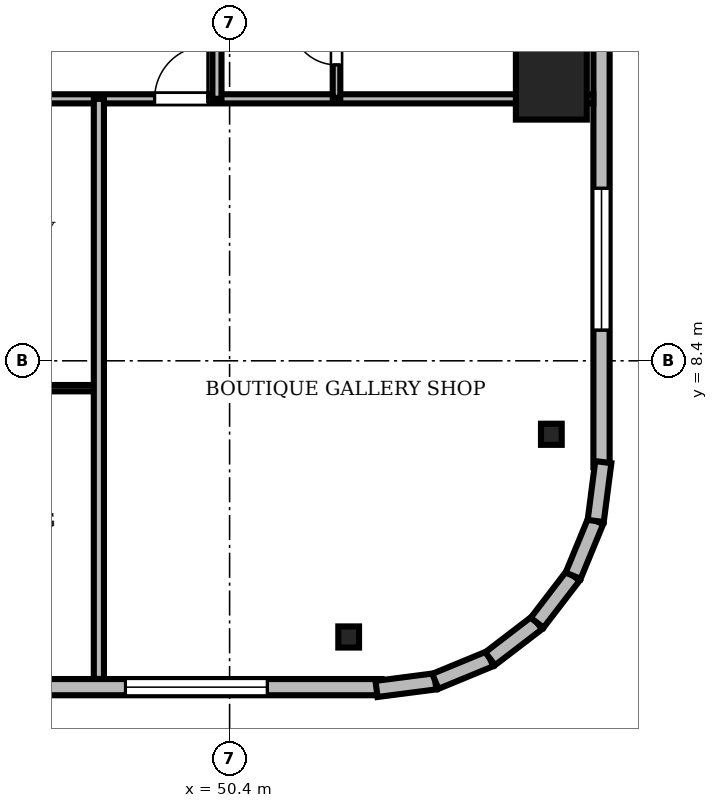
"""IFC4 building model, lengths in metres.
Left out: names, types, materials, properties, quantities, classifications, styles, units other than length and angle.
Written with IfcOpenShell. Run it as: python <this file> out.ifc"""

import sys

from ifc_helpers import new_model, si_unit, direction, frame, frame_2d, origin, origin_2d, place, context, subcontext, project, spatial, rectangle, i_section, extrude, source, transform, mapped, element, fill, save


model = new_model("IFC4")
c1 = context("Model", 3, precision=1e-05, world=origin(), true_north=direction((0.0, 1.0)))
c2 = subcontext(c1, "Body", "Model", "MODEL_VIEW")
j1 = project(units=[si_unit("LENGTHUNIT", "METRE"), si_unit("PLANEANGLEUNIT", "RADIAN")], contexts=[c1])
p1 = place(None, origin())
s1 = spatial("IfcSite", under=j1, at=p1, CompositionType="ELEMENT")
p2 = place(p1, origin())
s2 = spatial("IfcBuilding", under=s1, at=p2, CompositionType="ELEMENT")
p3 = place(p2, frame((0.0, 0.0, 233.55)))
s3 = spatial("IfcBuildingStorey", under=s2, at=p3, CompositionType="ELEMENT", Elevation=233.55)
m1 = source(origin(), c2, "Body", "SweptSolid", [
    extrude(rectangle(XDim=1.4, YDim=1.4, at=origin_2d()), origin(), (0.0, 0.0, 1.0), 3.1),
])
p4 = place(p3, frame((56.75, 13.86, 0.0), z_axis=(0.0, 0.0, 1.0), x_axis=(1.0, 0.0, 0.0)))
e1 = element("IfcColumn", 1, at=p4, inside=s3, PredefinedType="COLUMN", context=c2, shape_type="MappedRepresentation", body=[
    mapped(m1, transform((0.0, 0.0, 0.0), scale=1.0)),
])
m2 = source(origin(), c2, "Body", "SweptSolid", [
    extrude(i_section(OverallWidth=0.409, OverallDepth=0.417, WebThickness=0.021, FlangeThickness=0.033, FilletRadius=0.015, at=origin_2d()), origin(), (0.0, 0.0, 1.0), 3.1),
])
for number, where, z_axis, x_axis in (
    (2, (52.75, 2.95, 0.0), (0.0, 0.0, 1.0), (1.0, 0.0, 0.0)),
    (3, (56.75, 6.95, 0.0), (0.0, 0.0, 1.0), (1.0, 0.0, 0.0)),
):
    element("IfcColumn", number, at=place(p3, frame(where, z_axis=z_axis, x_axis=x_axis)), inside=s3, PredefinedType="COLUMN", context=c2, shape_type="MappedRepresentation", body=[
        mapped(m2, transform((0.0, 0.0, 0.0), scale=1.0)),
    ])
m3 = source(origin(), c2, "Body", "SweptSolid", [
    extrude(rectangle(XDim=15.6, YDim=0.32, at=frame_2d((7.8, 0.0))), origin(), (0.0, 0.0, 1.0), 3.1),
])
p5 = place(p3, frame((37.8, 1.96, 0.0), z_axis=(0.0, 0.0, 1.0), x_axis=(1.0, 0.0, 0.0)))
e4 = element("IfcWall", 4, at=p5, inside=s3, PredefinedType="SOLIDWALL", context=c2, shape_type="MappedRepresentation", body=[
    mapped(m3, transform((0.0, 0.0, 0.0), scale=1.0)),
])
m4 = source(origin(), c2, "Body", "SweptSolid", [
    extrude(rectangle(XDim=2.8, YDim=2.4, at=frame_2d((1.4, 1.2))), frame((0.0, 0.17, 0.0), z_axis=(0.0, -1.0, 0.0), x_axis=(1.0, 0.0, 0.0)), (0.0, 0.0, 1.0), 0.34),
])
p6 = place(p5, frame((10.545, 0.0, 0.44)))
e5 = element("IfcOpeningElement", 5, at=p6, cuts=e4, PredefinedType="OPENING", context=c2, shape_type="MappedRepresentation", body=[
    mapped(m4, transform((0.0, 0.0, 0.0), scale=1.0)),
])
p7 = place(p3, frame((57.74, 6.3, 0.0), z_axis=(0.0, 0.0, 1.0), x_axis=(0.0, 1.0, 0.0)))
e6 = element("IfcWall", 6, at=p7, inside=s3, PredefinedType="SOLIDWALL", context=c2, shape_type="MappedRepresentation", body=[
    mapped(m3, transform((0.0, 0.0, 0.0), scale=1.0)),
])
m5 = source(origin(), c2, "Body", "SweptSolid", [
    extrude(rectangle(XDim=1.4, YDim=2.3, at=frame_2d((0.7, 1.15))), frame((0.0, 0.17, 0.0), z_axis=(0.0, -1.0, 0.0), x_axis=(1.0, 0.0, 0.0)), (0.0, 0.0, 1.0), 0.34),
])
p8 = place(p7, frame((9.61, 0.0, 0.0)))
e7 = element("IfcOpeningElement", 7, at=p8, cuts=e6, PredefinedType="OPENING", context=c2, shape_type="MappedRepresentation", body=[
    mapped(m5, transform((0.0, 0.0, 0.0), scale=1.0)),
])
p9 = place(p7, frame((2.705, 0.0, 0.44)))
e8 = element("IfcOpeningElement", 8, at=p9, cuts=e6, PredefinedType="OPENING", context=c2, shape_type="MappedRepresentation", body=[
    mapped(m4, transform((0.0, 0.0, 0.0), scale=1.0)),
])
m6 = source(origin(), c2, "Body", "SweptSolid", [
    extrude(rectangle(XDim=1.17, YDim=0.32, at=frame_2d((0.585, 0.0))), origin(), (0.0, 0.0, 1.0), 3.1),
])
p10 = place(p3, frame((53.3, 1.925, 0.0), z_axis=(0.0, 0.0, 1.0), x_axis=(0.991762485493, 0.128090485085, 0.0)))
e9 = element("IfcWall", 9, at=p10, inside=s3, PredefinedType="SOLIDWALL", context=c2, shape_type="MappedRepresentation", body=[
    mapped(m6, transform((0.0, 0.0, 0.0), scale=1.0)),
])
m7 = source(origin(), c2, "Body", "SweptSolid", [
    extrude(rectangle(XDim=1.169, YDim=0.32, at=frame_2d((0.585, 0.0))), origin(), (0.0, 0.0, 1.0), 3.1),
])
p11 = place(p3, frame((54.46, 2.074, 0.0), z_axis=(0.0, 0.0, 1.0), x_axis=(0.924479075121, 0.381232789334, 0.0)))
e10 = element("IfcWall", 10, at=p11, inside=s3, PredefinedType="SOLIDWALL", context=c2, shape_type="MappedRepresentation", body=[
    mapped(m7, transform((0.0, 0.0, 0.0), scale=1.0)),
])
m8 = source(origin(), c2, "Body", "SweptSolid", [
    extrude(rectangle(XDim=1.169, YDim=0.32, at=frame_2d((0.584, 0.0))), origin(), (0.0, 0.0, 1.0), 3.1),
])
p12 = place(p3, frame((55.541, 2.52, 0.0), z_axis=(0.0, 0.0, 1.0), x_axis=(0.793663520347, 0.608356981114, 0.0)))
e11 = element("IfcWall", 11, at=p12, inside=s3, PredefinedType="SOLIDWALL", context=c2, shape_type="MappedRepresentation", body=[
    mapped(m8, transform((0.0, 0.0, 0.0), scale=1.0)),
])
m9 = source(origin(), c2, "Body", "SweptSolid", [
    extrude(rectangle(XDim=1.169, YDim=0.32, at=frame_2d((0.584, 0.0))), origin(), (0.0, 0.0, 1.0), 3.1),
])
for number, where, z_axis, x_axis in (
    (12, (56.469, 3.231, 0.0), (0.0, 0.0, 1.0), (0.608, 0.794, 0.0)),
    (13, (57.18, 4.159, 0.0), (0.0, 0.0, 1.0), (0.381, 0.925, 0.0)),
):
    element("IfcWall", number, at=place(p3, frame(where, z_axis=z_axis, x_axis=x_axis)), inside=s3, PredefinedType="SOLIDWALL", context=c2, shape_type="MappedRepresentation", body=[
        mapped(m9, transform((0.0, 0.0, 0.0), scale=1.0)),
    ])
m10 = source(origin(), c2, "Body", "SweptSolid", [
    extrude(rectangle(XDim=1.171, YDim=0.32, at=frame_2d((0.585, 0.0))), origin(), (0.0, 0.0, 1.0), 3.1),
])
p13 = place(p3, frame((57.625, 5.24, 0.0), z_axis=(0.0, 0.0, 1.0), x_axis=(0.128269133229, 0.991739395941, 0.0)))
e14 = element("IfcWall", 14, at=p13, inside=s3, PredefinedType="SOLIDWALL", context=c2, shape_type="MappedRepresentation", body=[
    mapped(m10, transform((0.0, 0.0, 0.0), scale=1.0)),
])
m11 = source(origin(), c2, "Body", "SweptSolid", [
    extrude(rectangle(XDim=46.156, YDim=0.18, at=frame_2d((23.078, 0.0))), origin(), (0.0, 0.0, 1.0), 2.376),
])
p14 = place(p3, frame((11.422, 13.57, 0.0), z_axis=(0.0, 0.0, 1.0), x_axis=(1.0, 0.0, 0.0)))
e15 = element("IfcWall", 15, at=p14, inside=s3, PredefinedType="PARTITIONING", context=c2, shape_type="MappedRepresentation", body=[
    mapped(m11, transform((0.0, 0.0, 0.0), scale=1.0)),
])
m12 = source(origin(), c2, "Body", "SweptSolid", [
    extrude(rectangle(XDim=1.05, YDim=2.2, at=frame_2d((0.525, 1.1))), frame((0.0, 0.1, 0.0), z_axis=(0.0, -1.0, 0.0), x_axis=(1.0, 0.0, 0.0)), (0.0, 0.0, 1.0), 0.2),
])
p15 = place(p14, frame((14.338, 0.0, 0.0)))
e16 = element("IfcOpeningElement", 16, at=p15, cuts=e15, PredefinedType="OPENING", context=c2, shape_type="MappedRepresentation", body=[
    mapped(m12, transform((0.0, 0.0, 0.0), scale=1.0)),
])
p16 = place(p14, frame((17.059, 0.0, 0.0)))
e17 = element("IfcOpeningElement", 17, at=p16, cuts=e15, PredefinedType="OPENING", context=c2, shape_type="MappedRepresentation", body=[
    mapped(m12, transform((0.0, 0.0, 0.0), scale=1.0)),
])
p17 = place(p14, frame((21.772, 0.0, 0.0)))
e18 = element("IfcOpeningElement", 18, at=p17, cuts=e15, PredefinedType="OPENING", context=c2, shape_type="MappedRepresentation", body=[
    mapped(m12, transform((0.0, 0.0, 0.0), scale=1.0)),
])
p18 = place(p14, frame((27.414, 0.0, 0.0)))
e19 = element("IfcOpeningElement", 19, at=p18, cuts=e15, PredefinedType="OPENING", context=c2, shape_type="MappedRepresentation", body=[
    mapped(m12, transform((0.0, 0.0, 0.0), scale=1.0)),
])
p19 = place(p14, frame((33.057, 0.0, 0.0)))
e20 = element("IfcOpeningElement", 20, at=p19, cuts=e15, PredefinedType="OPENING", context=c2, shape_type="MappedRepresentation", body=[
    mapped(m12, transform((0.0, 0.0, 0.0), scale=1.0)),
])
p20 = place(p14, frame((37.498, 0.0, 0.0)))
e21 = element("IfcOpeningElement", 21, at=p20, cuts=e15, PredefinedType="OPENING", context=c2, shape_type="MappedRepresentation", body=[
    mapped(m12, transform((0.0, 0.0, 0.0), scale=1.0)),
])
m13 = source(origin(), c2, "Body", "SweptSolid", [
    extrude(rectangle(XDim=27.53, YDim=0.18, at=frame_2d((13.765, 0.0))), origin(), (0.0, 0.0, 1.0), 2.542),
])
p21 = place(p3, frame((50.15, 13.57, 0.0), z_axis=(0.0, 0.0, 1.0), x_axis=(0.0, 1.0, 0.0)))
e22 = element("IfcWall", 22, at=p21, inside=s3, PredefinedType="PARTITIONING", context=c2, shape_type="MappedRepresentation", body=[
    mapped(m13, transform((0.0, 0.0, 0.0), scale=1.0)),
])
p22 = place(p21, frame((5.217, 0.0, 0.0)))
e23 = element("IfcOpeningElement", 23, at=p22, cuts=e22, PredefinedType="OPENING", context=c2, shape_type="MappedRepresentation", body=[
    mapped(m12, transform((0.0, 0.0, 0.0), scale=1.0)),
])
p23 = place(p21, frame((14.32, 0.0, 0.0)))
e24 = element("IfcOpeningElement", 24, at=p23, cuts=e22, PredefinedType="OPENING", context=c2, shape_type="MappedRepresentation", body=[
    mapped(m12, transform((0.0, 0.0, 0.0), scale=1.0)),
])
p24 = place(p21, frame((23.423, 0.0, 0.0)))
e25 = element("IfcOpeningElement", 25, at=p24, cuts=e22, PredefinedType="OPENING", context=c2, shape_type="MappedRepresentation", body=[
    mapped(m12, transform((0.0, 0.0, 0.0), scale=1.0)),
])
m14 = source(origin(), c2, "Body", "SweptSolid", [
    extrude(rectangle(XDim=5.642, YDim=0.125, at=frame_2d((2.821, 0.0))), origin(), (0.0, 0.0, 1.0), 2.542),
])
p25 = place(p3, frame((42.178, 7.86, 0.0), z_axis=(0.0, 0.0, 1.0), x_axis=(1.0, 0.0, 0.0)))
e26 = element("IfcWall", 26, at=p25, inside=s3, PredefinedType="PARTITIONING", context=c2, shape_type="MappedRepresentation", body=[
    mapped(m14, transform((0.0, 0.0, 0.0), scale=1.0)),
])
m15 = source(origin(), c2, "Body", "SweptSolid", [
    extrude(rectangle(XDim=0.95, YDim=2.15, at=frame_2d((0.475, 1.075))), frame((0.0, 0.073, 0.0), z_axis=(0.0, -1.0, 0.0), x_axis=(1.0, 0.0, 0.0)), (0.0, 0.0, 1.0), 0.145),
])
p26 = place(p25, frame((2.341, 0.0, 0.0)))
e27 = element("IfcOpeningElement", 27, at=p26, cuts=e26, PredefinedType="OPENING", context=c2, shape_type="MappedRepresentation", body=[
    mapped(m15, transform((0.0, 0.0, 0.0), scale=1.0)),
])
m16 = source(origin(), c2, "Body", "SweptSolid", [
    extrude(rectangle(XDim=2.29, YDim=0.15, at=frame_2d((1.145, 0.0))), origin(), (0.0, 0.0, 1.0), 2.542),
])
p27 = place(p3, frame((52.51, 13.59, 0.0), z_axis=(0.0, 0.0, 1.0), x_axis=(0.0, 1.0, 0.0)))
e28 = element("IfcWall", 28, at=p27, inside=s3, PredefinedType="PARTITIONING", context=c2, shape_type="MappedRepresentation", body=[
    mapped(m16, transform((0.0, 0.0, 0.0), scale=1.0)),
])
m17 = source(origin(), c2, "Body", "SweptSolid", [
    extrude(rectangle(XDim=0.9, YDim=2.1, at=frame_2d((0.45, 1.05))), frame((0.0, 0.085, 0.0), z_axis=(0.0, -1.0, 0.0), x_axis=(1.0, 0.0, 0.0)), (0.0, 0.0, 1.0), 0.17),
])
p28 = place(p27, frame((0.65, 0.0, 0.0)))
e29 = element("IfcOpeningElement", 29, at=p28, cuts=e28, PredefinedType="OPENING", context=c2, shape_type="MappedRepresentation", body=[
    mapped(m17, transform((0.0, 0.0, 0.0), scale=1.0)),
])
m18 = source(origin(), c2, "Body", "SweptSolid", [
    extrude(rectangle(XDim=11.448, YDim=0.2, at=frame_2d((5.724, 0.0))), origin(), (0.0, 0.0, 1.0), 2.376),
])
p29 = place(p3, frame((47.82, 2.122, 0.0), z_axis=(0.0, 0.0, 1.0), x_axis=(0.0, 1.0, 0.0)))
e30 = element("IfcWall", 30, at=p29, inside=s3, PredefinedType="PARTITIONING", context=c2, shape_type="MappedRepresentation", body=[
    mapped(m18, transform((0.0, 0.0, 0.0), scale=1.0)),
])
m19 = source(origin(), c2, "Body", "SweptSolid", [
    extrude(rectangle(XDim=2.8, YDim=2.4, at=frame_2d((1.4, 1.2))), frame((0.0, 0.03, 0.0), z_axis=(0.0, -1.0, 0.0), x_axis=(1.0, 0.0, 0.0)), (0.0, 0.0, 1.0), 0.06),
])
p30 = place(p6, origin())
e31 = element("IfcWindow", 31, at=p30, inside=s3, PartitioningType="SINGLE_PANEL", PredefinedType="WINDOW", context=c2, shape_type="MappedRepresentation", body=[
    mapped(m19, transform((0.0, 0.0, 0.0), scale=1.0)),
])
fill(e5, e31)
p31 = place(p9, origin())
e32 = element("IfcWindow", 32, at=p31, inside=s3, PartitioningType="SINGLE_PANEL", PredefinedType="WINDOW", context=c2, shape_type="MappedRepresentation", body=[
    mapped(m19, transform((0.0, 0.0, 0.0), scale=1.0)),
])
fill(e8, e32)
m20 = source(origin(), c2, "Body", "SweptSolid", [
    extrude(rectangle(XDim=1.05, YDim=2.2, at=frame_2d((0.525, 1.1))), frame((0.0, 0.025, 0.0), z_axis=(0.0, -1.0, 0.0), x_axis=(1.0, 0.0, 0.0)), (0.0, 0.0, 1.0), 0.05),
])
p32 = place(p20, origin())
e33 = element("IfcDoor", 33, at=p32, inside=s3, OperationType="SINGLE_SWING_RIGHT", PredefinedType="DOOR", context=c2, shape_type="MappedRepresentation", body=[
    mapped(m20, transform((0.0, 0.0, 0.0), scale=1.0)),
])
fill(e21, e33)
m21 = source(origin(), c2, "Body", "SweptSolid", [
    extrude(rectangle(XDim=0.9, YDim=2.1, at=frame_2d((0.45, 1.05))), frame((0.0, 0.025, 0.0), z_axis=(0.0, -1.0, 0.0), x_axis=(1.0, 0.0, 0.0)), (0.0, 0.0, 1.0), 0.05),
])
p33 = place(p28, origin())
e34 = element("IfcDoor", 34, at=p33, inside=s3, OperationType="SINGLE_SWING_RIGHT", PredefinedType="DOOR", context=c2, shape_type="MappedRepresentation", body=[
    mapped(m21, transform((0.0, 0.0, 0.0), scale=1.0)),
])
fill(e29, e34)
save(model, sys.argv[1])
